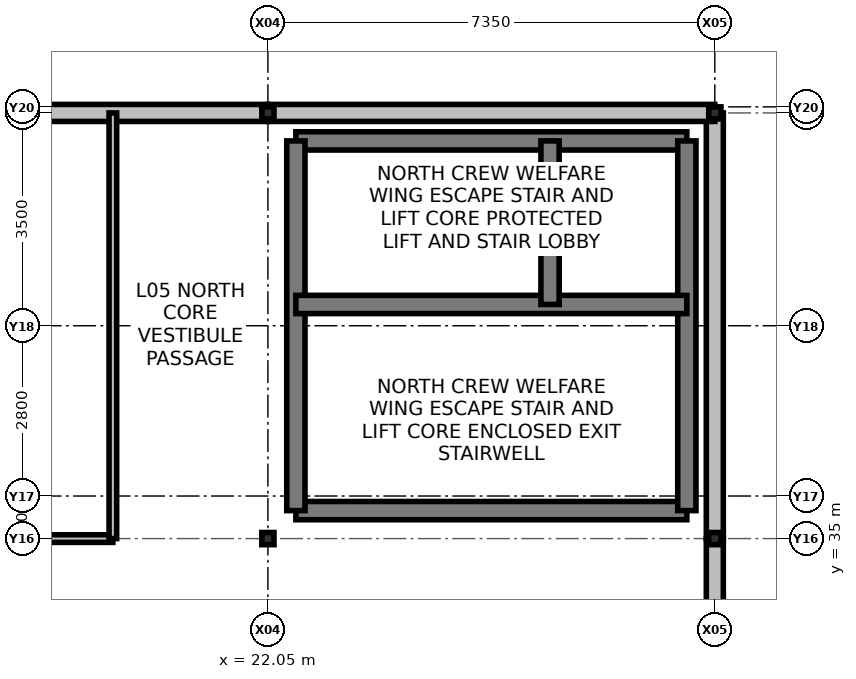
"""IFC4 building model, lengths in metres.
Left out: names, types, materials, properties, quantities, classifications, styles, units other than length and angle.
Written with IfcOpenShell. Run it as: python <this file> out.ifc"""

import sys

from ifc_helpers import new_model, si_unit, direction, frame, frame_2d, origin, origin_2d, place, context, subcontext, project, spatial, rectangle, i_section, extrude, element, fill, save


model = new_model("IFC4")
c1 = context("Model", 3, precision=1e-05, world=origin(), true_north=direction((0.0, 1.0)))
c2 = subcontext(c1, "Body", "Model", "MODEL_VIEW")
j1 = project(units=[si_unit("LENGTHUNIT", "METRE"), si_unit("PLANEANGLEUNIT", "RADIAN")], contexts=[c1])
p1 = place(None, origin())
s1 = spatial("IfcSite", under=j1, at=p1, CompositionType="ELEMENT")
p2 = place(p1, origin())
s2 = spatial("IfcBuilding", under=s1, at=p2, CompositionType="ELEMENT")
p3 = place(p2, frame((0.0, 0.0, 19.5)))
s3 = spatial("IfcBuildingStorey", under=s2, at=p3, CompositionType="ELEMENT", Elevation=19.5)
for number, where, z_axis, x_axis in (
    (1, (22.05, 35.0, 0.0), (0.0, 0.0, 1.0), (1.0, 0.0, 0.0)),
    (2, (22.05, 42.0, 0.0), (0.0, 0.0, 1.0), (1.0, 0.0, 0.0)),
    (3, (29.4, 35.0, 0.0), (0.0, 0.0, 1.0), (1.0, 0.0, 0.0)),
    (4, (29.4, 42.0, 0.0), (0.0, 0.0, 1.0), (1.0, 0.0, 0.0)),
):
    element("IfcColumn", number, at=place(p3, frame(where, z_axis=z_axis, x_axis=x_axis)), inside=s3, PredefinedType="COLUMN", context=c2, shape_type="SweptSolid", body=[
        extrude(i_section(OverallWidth=0.2, OverallDepth=0.2, WebThickness=0.008, FlangeThickness=0.012, at=origin_2d()), origin(), (0.0, 0.0, 1.0), 4.2),
    ])
p4 = place(p3, frame((29.4, 28.0, 0.0), z_axis=(0.0, 0.0, 1.0), x_axis=(0.0, 1.0, 0.0)))
e5 = element("IfcWall", 5, at=p4, inside=s3, PredefinedType="SOLIDWALL", context=c2, shape_type="SweptSolid", body=[
    extrude(rectangle(XDim=7.0, YDim=0.28, at=frame_2d((3.5, 0.0))), origin(), (0.0, 0.0, 1.0), 3.48),
])
p5 = place(p4, frame((2.2, 0.0, 0.9)))
e6 = element("IfcOpeningElement", 6, at=p5, cuts=e5, PredefinedType="OPENING", context=c2, shape_type="SweptSolid", body=[
    extrude(rectangle(XDim=3.0, YDim=1.8, at=frame_2d((1.5, 0.9))), frame((0.0, 0.15, 0.0), z_axis=(0.0, -1.0, 0.0), x_axis=(1.0, 0.0, 0.0)), (0.0, 0.0, 1.0), 0.3),
])
p6 = place(p3, frame((29.4, 35.0, 0.0), z_axis=(0.0, 0.0, 1.0), x_axis=(0.0, 1.0, 0.0)))
e7 = element("IfcWall", 7, at=p6, inside=s3, PredefinedType="SOLIDWALL", context=c2, shape_type="SweptSolid", body=[
    extrude(rectangle(XDim=7.0, YDim=0.28, at=frame_2d((3.5, 0.0))), origin(), (0.0, 0.0, 1.0), 3.48),
])
p7 = place(p6, frame((2.2, 0.0, 0.9)))
e8 = element("IfcOpeningElement", 8, at=p7, cuts=e7, PredefinedType="OPENING", context=c2, shape_type="SweptSolid", body=[
    extrude(rectangle(XDim=3.0, YDim=2.2, at=frame_2d((1.5, 1.1))), frame((0.0, 0.15, 0.0), z_axis=(0.0, -1.0, 0.0), x_axis=(1.0, 0.0, 0.0)), (0.0, 0.0, 1.0), 0.3),
])
p8 = place(p3, frame((14.7, 42.0, 0.0), z_axis=(0.0, 0.0, 1.0), x_axis=(1.0, 0.0, 0.0)))
e9 = element("IfcWall", 9, at=p8, inside=s3, PredefinedType="SOLIDWALL", context=c2, shape_type="SweptSolid", body=[
    extrude(rectangle(XDim=7.35, YDim=0.28, at=frame_2d((3.675, 0.0))), origin(), (0.0, 0.0, 1.0), 3.48),
])
p9 = place(p8, frame((1.4, 0.0, 0.9)))
e10 = element("IfcOpeningElement", 10, at=p9, cuts=e9, PredefinedType="OPENING", context=c2, shape_type="SweptSolid", body=[
    extrude(rectangle(XDim=2.8, YDim=2.1, at=frame_2d((1.4, 1.05))), frame((0.0, 0.15, 0.0), z_axis=(0.0, -1.0, 0.0), x_axis=(1.0, 0.0, 0.0)), (0.0, 0.0, 1.0), 0.3),
])
p10 = place(p3, frame((22.05, 42.0, 0.0), z_axis=(0.0, 0.0, 1.0), x_axis=(1.0, 0.0, 0.0)))
e11 = element("IfcWall", 11, at=p10, inside=s3, PredefinedType="SOLIDWALL", context=c2, shape_type="SweptSolid", body=[
    extrude(rectangle(XDim=7.35, YDim=0.28, at=frame_2d((3.675, 0.0))), origin(), (0.0, 0.0, 1.0), 3.48),
])
p11 = place(p10, frame((2.4, 0.0, 0.9)))
e12 = element("IfcOpeningElement", 12, at=p11, cuts=e11, PredefinedType="OPENING", context=c2, shape_type="SweptSolid", body=[
    extrude(rectangle(XDim=3.0, YDim=1.8, at=frame_2d((1.5, 0.9))), frame((0.0, 0.15, 0.0), z_axis=(0.0, -1.0, 0.0), x_axis=(1.0, 0.0, 0.0)), (0.0, 0.0, 1.0), 0.3),
])
for number, where, z_axis, x_axis in (
    (13, (22.51, 35.46, 0.0), (0.0, 0.0, 1.0), (1.0, 0.0, 0.0)),
    (14, (22.51, 41.54, 0.0), (0.0, 0.0, 1.0), (1.0, 0.0, 0.0)),
):
    element("IfcWall", number, at=place(p3, frame(where, z_axis=z_axis, x_axis=x_axis)), inside=s3, PredefinedType="SHEAR", context=c2, shape_type="SweptSolid", body=[
        extrude(rectangle(XDim=6.43, YDim=0.3, at=frame_2d((3.215, 0.0))), origin(), (0.0, 0.0, 1.0), 3.92),
    ])
p12 = place(p3, frame((22.51, 35.46, 0.0), z_axis=(0.0, 0.0, 1.0), x_axis=(0.0, 1.0, 0.0)))
e15 = element("IfcWall", 15, at=p12, inside=s3, PredefinedType="SHEAR", context=c2, shape_type="SweptSolid", body=[
    extrude(rectangle(XDim=6.08, YDim=0.3, at=frame_2d((3.04, 0.0))), origin(), (0.0, 0.0, 1.0), 3.92),
])
p13 = place(p12, frame((3.84, 0.0, 0.0)))
e16 = element("IfcOpeningElement", 16, at=p13, cuts=e15, PredefinedType="OPENING", context=c2, shape_type="SweptSolid", body=[
    extrude(rectangle(XDim=1.5, YDim=2.2, at=frame_2d((0.75, 1.1))), frame((0.0, 0.16, 0.0), z_axis=(0.0, -1.0, 0.0), x_axis=(1.0, 0.0, 0.0)), (0.0, 0.0, 1.0), 0.32),
])
p14 = place(p3, frame((28.94, 35.46, 0.0), z_axis=(0.0, 0.0, 1.0), x_axis=(0.0, 1.0, 0.0)))
e17 = element("IfcWall", 17, at=p14, inside=s3, PredefinedType="SHEAR", context=c2, shape_type="SweptSolid", body=[
    extrude(rectangle(XDim=6.08, YDim=0.3, at=frame_2d((3.04, 0.0))), origin(), (0.0, 0.0, 1.0), 3.92),
])
p15 = place(p3, frame((22.51, 38.85, 0.0), z_axis=(0.0, 0.0, 1.0), x_axis=(1.0, 0.0, 0.0)))
e18 = element("IfcWall", 18, at=p15, inside=s3, PredefinedType="SHEAR", context=c2, shape_type="SweptSolid", body=[
    extrude(rectangle(XDim=6.43, YDim=0.3, at=frame_2d((3.215, 0.0))), origin(), (0.0, 0.0, 1.0), 3.92),
])
p16 = place(p15, frame((0.185, 0.0, 0.0)))
e19 = element("IfcOpeningElement", 19, at=p16, cuts=e18, PredefinedType="OPENING", context=c2, shape_type="SweptSolid", body=[
    extrude(rectangle(XDim=1.05, YDim=2.15, at=frame_2d((0.525, 1.075))), frame((0.0, 0.16, 0.0), z_axis=(0.0, -1.0, 0.0), x_axis=(1.0, 0.0, 0.0)), (0.0, 0.0, 1.0), 0.32),
])
p17 = place(p3, frame((26.69, 38.85, 0.0), z_axis=(0.0, 0.0, 1.0), x_axis=(0.0, 1.0, 0.0)))
e20 = element("IfcWall", 20, at=p17, inside=s3, PredefinedType="SHEAR", context=c2, shape_type="SweptSolid", body=[
    extrude(rectangle(XDim=2.69, YDim=0.3, at=frame_2d((1.345, 0.0))), origin(), (0.0, 0.0, 1.0), 3.92),
])
p18 = place(p17, frame((0.4, 0.0, 0.0)))
e21 = element("IfcOpeningElement", 21, at=p18, cuts=e20, PredefinedType="OPENING", context=c2, shape_type="SweptSolid", body=[
    extrude(rectangle(XDim=1.1, YDim=2.15, at=frame_2d((0.55, 1.075))), frame((0.0, 0.16, 0.0), z_axis=(0.0, -1.0, 0.0), x_axis=(1.0, 0.0, 0.0)), (0.0, 0.0, 1.0), 0.32),
])
p19 = place(p3, frame((7.35, 35.0, 0.0), z_axis=(0.0, 0.0, 1.0), x_axis=(1.0, 0.0, 0.0)))
e22 = element("IfcWall", 22, at=p19, inside=s3, PredefinedType="PARTITIONING", context=c2, shape_type="SweptSolid", body=[
    extrude(rectangle(XDim=12.15, YDim=0.125, at=frame_2d((6.075, 0.0))), origin(), (0.0, 0.0, 1.0), 3.25),
])
p20 = place(p19, frame((4.0, 0.0, 0.0)))
e23 = element("IfcOpeningElement", 23, at=p20, cuts=e22, PredefinedType="OPENING", context=c2, shape_type="SweptSolid", body=[
    extrude(rectangle(XDim=1.25, YDim=2.15, at=frame_2d((0.625, 1.075))), frame((0.0, 0.072, 0.0), z_axis=(0.0, -1.0, 0.0), x_axis=(1.0, 0.0, 0.0)), (0.0, 0.0, 1.0), 0.145),
])
p21 = place(p3, frame((19.5, 35.0, 0.0), z_axis=(0.0, 0.0, 1.0), x_axis=(0.0, 1.0, 0.0)))
e24 = element("IfcWall", 24, at=p21, inside=s3, PredefinedType="PARTITIONING", context=c2, shape_type="SweptSolid", body=[
    extrude(rectangle(XDim=7.0, YDim=0.125, at=frame_2d((3.5, 0.0))), origin(), (0.0, 0.0, 1.0), 3.25),
])
p22 = place(p7, origin())
e25 = element("IfcWindow", 25, at=p22, inside=s3, PartitioningType="SINGLE_PANEL", PredefinedType="WINDOW", context=c2, shape_type="SweptSolid", body=[
    extrude(rectangle(XDim=3.0, YDim=2.2, at=frame_2d((1.5, 1.1))), frame((0.0, 0.03, 0.0), z_axis=(0.0, -1.0, 0.0), x_axis=(1.0, 0.0, 0.0)), (0.0, 0.0, 1.0), 0.06),
])
fill(e8, e25)
p23 = place(p9, origin())
e26 = element("IfcWindow", 26, at=p23, inside=s3, PartitioningType="SINGLE_PANEL", PredefinedType="WINDOW", context=c2, shape_type="SweptSolid", body=[
    extrude(rectangle(XDim=2.8, YDim=2.1, at=frame_2d((1.4, 1.05))), frame((0.0, 0.03, 0.0), z_axis=(0.0, -1.0, 0.0), x_axis=(1.0, 0.0, 0.0)), (0.0, 0.0, 1.0), 0.06),
])
fill(e10, e26)
p24 = place(p11, origin())
e27 = element("IfcWindow", 27, at=p24, inside=s3, PartitioningType="SINGLE_PANEL", PredefinedType="WINDOW", context=c2, shape_type="SweptSolid", body=[
    extrude(rectangle(XDim=3.0, YDim=1.8, at=frame_2d((1.5, 0.9))), frame((0.0, 0.03, 0.0), z_axis=(0.0, -1.0, 0.0), x_axis=(1.0, 0.0, 0.0)), (0.0, 0.0, 1.0), 0.06),
])
fill(e12, e27)
p25 = place(p16, origin())
e28 = element("IfcDoor", 28, at=p25, inside=s3, OperationType="SINGLE_SWING_RIGHT", PredefinedType="DOOR", context=c2, shape_type="SweptSolid", body=[
    extrude(rectangle(XDim=1.05, YDim=2.15, at=frame_2d((0.525, 1.075))), frame((0.0, 0.025, 0.0), z_axis=(0.0, -1.0, 0.0), x_axis=(1.0, 0.0, 0.0)), (0.0, 0.0, 1.0), 0.05),
])
fill(e19, e28)
p26 = place(p13, origin())
e29 = element("IfcDoor", 29, at=p26, inside=s3, OperationType="DOUBLE_DOOR_SINGLE_SWING", PredefinedType="DOOR", context=c2, shape_type="SweptSolid", body=[
    extrude(rectangle(XDim=1.5, YDim=2.2, at=frame_2d((0.75, 1.1))), frame((0.0, 0.025, 0.0), z_axis=(0.0, -1.0, 0.0), x_axis=(1.0, 0.0, 0.0)), (0.0, 0.0, 1.0), 0.05),
])
fill(e16, e29)
p27 = place(p18, origin())
e30 = element("IfcDoor", 30, at=p27, inside=s3, OperationType="SLIDING_TO_LEFT", PredefinedType="DOOR", context=c2, shape_type="SweptSolid", body=[
    extrude(rectangle(XDim=1.1, YDim=2.15, at=frame_2d((0.55, 1.075))), frame((0.0, 0.025, 0.0), z_axis=(0.0, -1.0, 0.0), x_axis=(1.0, 0.0, 0.0)), (0.0, 0.0, 1.0), 0.05),
])
fill(e21, e30)
save(model, sys.argv[1])
